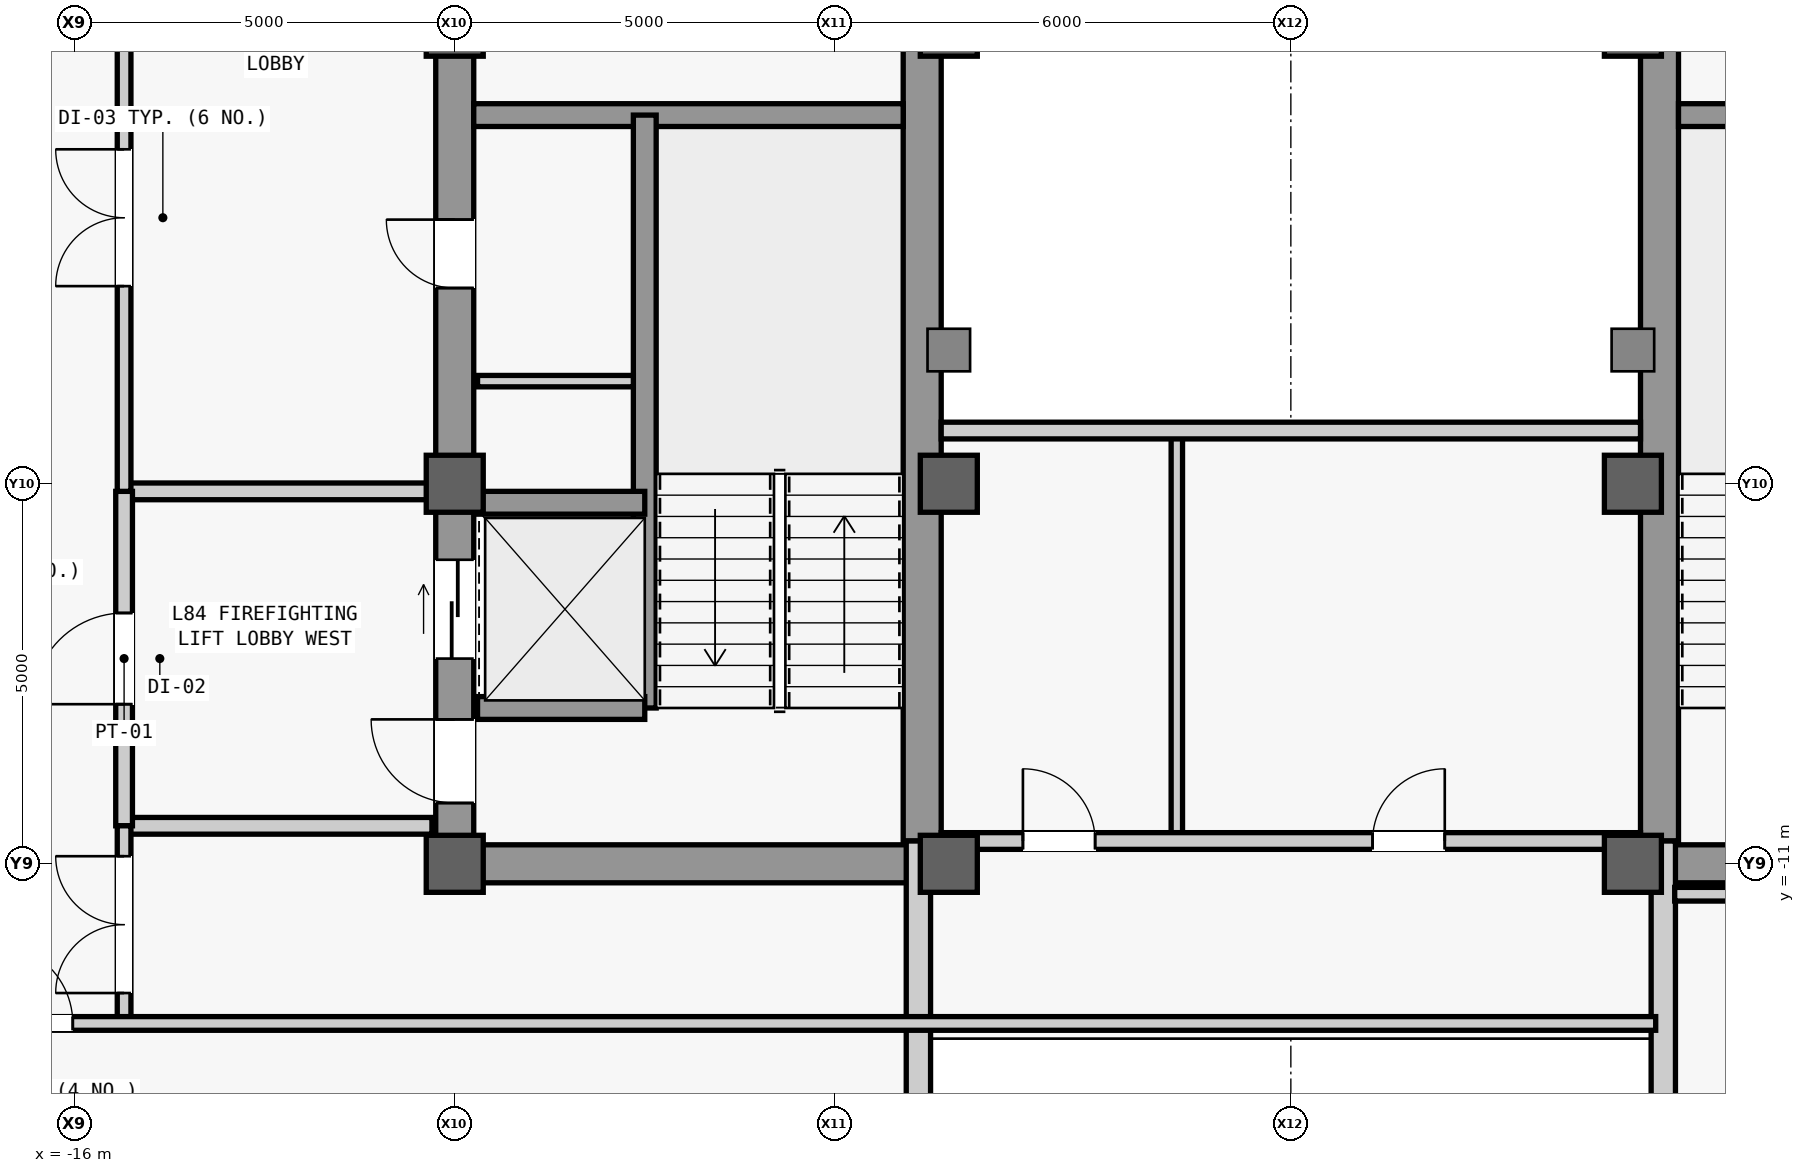
"""IFC4 building model, lengths in metres.
Left out: names, types, materials, properties, quantities, classifications, styles, units other than length and angle.
Written with IfcOpenShell. Run it as: python <this file> out.ifc"""

import sys

from ifc_helpers import new_model, si_unit, direction, frame, frame_2d, origin, origin_2d, place, context, subcontext, project, spatial, rectangle, extrude, source, transform, mapped, element, fill, save


model = new_model("IFC4")
c1 = context("Model", 3, precision=1e-05, world=origin(), true_north=direction((0.0, 1.0)))
c2 = subcontext(c1, "Body", "Model", "MODEL_VIEW")
j1 = project(units=[si_unit("LENGTHUNIT", "METRE"), si_unit("PLANEANGLEUNIT", "RADIAN")], contexts=[c1])
p1 = place(None, origin())
s1 = spatial("IfcSite", under=j1, at=p1, CompositionType="ELEMENT")
p2 = place(p1, origin())
s2 = spatial("IfcBuilding", under=s1, at=p2, CompositionType="ELEMENT")
p3 = place(p2, frame((0.0, 0.0, 354.3)))
s3 = spatial("IfcBuildingStorey", under=s2, at=p3, CompositionType="ELEMENT", Elevation=354.3)
m1 = source(origin(), c2, "Body", "SweptSolid", [
    extrude(rectangle(XDim=22.0, YDim=0.5, at=frame_2d((11.0, 0.0))), origin(), (0.0, 0.0, 1.0), 3.74),
])
p4 = place(p3, frame((-11.0, -11.0, 0.0), z_axis=(0.0, 0.0, 1.0), x_axis=(0.0, 1.0, 0.0)))
e1 = element("IfcWall", 1, at=p4, inside=s3, PredefinedType="SHEAR", context=c2, shape_type="MappedRepresentation", body=[
    mapped(m1, transform((0.0, 0.0, 0.0), scale=1.0)),
])
m2 = source(origin(), c2, "Body", "SweptSolid", [
    extrude(rectangle(XDim=1.1, YDim=2.2, at=frame_2d((0.55, 1.1))), frame((0.0, 0.26, 0.0), z_axis=(0.0, -1.0, 0.0), x_axis=(1.0, 0.0, 0.0)), (0.0, 0.0, 1.0), 0.52),
])
p5 = place(p4, frame((0.8, 0.0, 0.0)))
e2 = element("IfcOpeningElement", 2, at=p5, cuts=e1, PredefinedType="OPENING", context=c2, shape_type="MappedRepresentation", body=[
    mapped(m2, transform((0.0, 0.0, 0.0), scale=1.0)),
])
p6 = place(p4, frame((12.5, 0.0, 0.0)))
e3 = element("IfcOpeningElement", 3, at=p6, cuts=e1, PredefinedType="OPENING", context=c2, shape_type="MappedRepresentation", body=[
    mapped(m2, transform((0.0, 0.0, 0.0), scale=1.0)),
])
m3 = source(origin(), c2, "Body", "SweptSolid", [
    extrude(rectangle(XDim=0.9, YDim=2.15, at=frame_2d((0.45, 1.075))), frame((0.0, 0.26, 0.0), z_axis=(0.0, -1.0, 0.0), x_axis=(1.0, 0.0, 0.0)), (0.0, 0.0, 1.0), 0.52),
])
p7 = place(p4, frame((7.575, 0.0, 0.0)))
e4 = element("IfcOpeningElement", 4, at=p7, cuts=e1, PredefinedType="OPENING", context=c2, shape_type="MappedRepresentation", body=[
    mapped(m3, transform((0.0, 0.0, 0.0), scale=1.0)),
])
m4 = source(origin(), c2, "Body", "SweptSolid", [
    extrude(rectangle(XDim=1.2, YDim=2.3, at=frame_2d((0.6, 1.15))), frame((0.0, 0.26, 0.0), z_axis=(0.0, -1.0, 0.0), x_axis=(1.0, 0.0, 0.0)), (0.0, 0.0, 1.0), 0.52),
])
p8 = place(p4, frame((14.6, 0.0, 0.0)))
e5 = element("IfcOpeningElement", 5, at=p8, cuts=e1, PredefinedType="OPENING", context=c2, shape_type="MappedRepresentation", body=[
    mapped(m4, transform((0.0, 0.0, 0.0), scale=1.0)),
])
p9 = place(p4, frame((18.2, 0.0, 0.0)))
e6 = element("IfcOpeningElement", 6, at=p9, cuts=e1, PredefinedType="OPENING", context=c2, shape_type="MappedRepresentation", body=[
    mapped(m4, transform((0.0, 0.0, 0.0), scale=1.0)),
])
m5 = source(origin(), c2, "Body", "SweptSolid", [
    extrude(rectangle(XDim=1.3, YDim=2.3, at=frame_2d((0.65, 1.15))), frame((0.0, 0.26, 0.0), z_axis=(0.0, -1.0, 0.0), x_axis=(1.0, 0.0, 0.0)), (0.0, 0.0, 1.0), 0.52),
])
p10 = place(p4, frame((2.7, 0.0, 0.0)))
e7 = element("IfcOpeningElement", 7, at=p10, cuts=e1, PredefinedType="OPENING", context=c2, shape_type="MappedRepresentation", body=[
    mapped(m5, transform((0.0, 0.0, 0.0), scale=1.0)),
])
m6 = source(origin(), c2, "Body", "SweptSolid", [
    extrude(rectangle(XDim=21.4, YDim=0.5, at=frame_2d((10.7, 0.0))), origin(), (0.0, 0.0, 1.0), 3.74),
])
for number, where, z_axis, x_axis in (
    (8, (-4.85, -10.7, 0.0), (0.0, 0.0, 1.0), (0.0, 1.0, 0.0)),
    (9, (4.85, -10.7, 0.0), (0.0, 0.0, 1.0), (0.0, 1.0, 0.0)),
):
    element("IfcWall", number, at=place(p3, frame(where, z_axis=z_axis, x_axis=x_axis)), inside=s3, PredefinedType="SHEAR", context=c2, shape_type="MappedRepresentation", body=[
        mapped(m6, transform((0.0, 0.0, 0.0), scale=1.0)),
    ])
m7 = source(origin(), c2, "Body", "SweptSolid", [
    extrude(rectangle(XDim=5.9, YDim=0.5, at=frame_2d((2.95, 0.0))), origin(), (0.0, 0.0, 1.0), 3.74),
])
for number, where, z_axis, x_axis in (
    (10, (-10.75, -11.0, 0.0), (0.0, 0.0, 1.0), (1.0, 0.0, 0.0)),
    (11, (4.85, -11.0, 0.0), (0.0, 0.0, 1.0), (1.0, 0.0, 0.0)),
):
    element("IfcWall", number, at=place(p3, frame(where, z_axis=z_axis, x_axis=x_axis)), inside=s3, PredefinedType="SHEAR", context=c2, shape_type="MappedRepresentation", body=[
        mapped(m7, transform((0.0, 0.0, 0.0), scale=1.0)),
    ])
m8 = source(origin(), c2, "Body", "SweptSolid", [
    extrude(rectangle(XDim=5.65, YDim=0.3, at=frame_2d((2.825, 0.0))), origin(), (0.0, 0.0, 1.0), 3.74),
])
for number, where, z_axis, x_axis in (
    (12, (-10.75, -1.15, 0.0), (0.0, 0.0, 1.0), (1.0, 0.0, 0.0)),
    (13, (5.1, -1.15, 0.0), (0.0, 0.0, 1.0), (1.0, 0.0, 0.0)),
):
    element("IfcWall", number, at=place(p3, frame(where, z_axis=z_axis, x_axis=x_axis)), inside=s3, PredefinedType="SHEAR", context=c2, shape_type="MappedRepresentation", body=[
        mapped(m8, transform((0.0, 0.0, 0.0), scale=1.0)),
    ])
m9 = source(origin(), c2, "Body", "SweptSolid", [
    extrude(rectangle(XDim=0.75, YDim=0.75, at=origin_2d()), origin(), (0.0, 0.0, 1.0), 4.0),
])
for number, where, z_axis, x_axis in (
    (14, (-11.0, -11.0, 0.0), (0.0, 0.0, 1.0), (1.0, 0.0, 0.0)),
    (15, (-11.0, -6.0, 0.0), (0.0, 0.0, 1.0), (1.0, 0.0, 0.0)),
    (16, (-11.0, 0.0, 0.0), (0.0, 0.0, 1.0), (1.0, 0.0, 0.0)),
    (17, (-4.5, -11.0, 0.0), (0.0, 0.0, 1.0), (1.0, 0.0, 0.0)),
    (18, (-4.5, -6.0, 0.0), (0.0, 0.0, 1.0), (1.0, 0.0, 0.0)),
    (19, (-4.5, 0.0, 0.0), (0.0, 0.0, 1.0), (1.0, 0.0, 0.0)),
    (20, (4.5, -11.0, 0.0), (0.0, 0.0, 1.0), (1.0, 0.0, 0.0)),
    (21, (4.5, -6.0, 0.0), (0.0, 0.0, 1.0), (1.0, 0.0, 0.0)),
    (22, (4.5, 0.0, 0.0), (0.0, 0.0, 1.0), (1.0, 0.0, 0.0)),
):
    element("IfcColumn", number, at=place(p3, frame(where, z_axis=z_axis, x_axis=x_axis)), inside=s3, PredefinedType="COLUMN", context=c2, shape_type="MappedRepresentation", body=[
        mapped(m9, transform((0.0, 0.0, 0.0), scale=1.0)),
    ])
m10 = source(origin(), c2, "Body", "SweptSolid", [
    extrude(rectangle(XDim=14.98, YDim=0.32, at=frame_2d((7.49, 0.0))), origin(), (0.0, 0.0, 1.0), 3.045),
])
for number, where, z_axis, x_axis in (
    (23, (-4.9, -25.68, 0.0), (0.0, 0.0, 1.0), (0.0, 1.0, 0.0)),
    (24, (4.9, -25.68, 0.0), (0.0, 0.0, 1.0), (0.0, 1.0, 0.0)),
):
    element("IfcWall", number, at=place(p3, frame(where, z_axis=z_axis, x_axis=x_axis)), inside=s3, PredefinedType="STANDARD", context=c2, shape_type="MappedRepresentation", body=[
        mapped(m10, transform((0.0, 0.0, 0.0), scale=1.0)),
    ])
m11 = source(origin(), c2, "Body", "SweptSolid", [
    extrude(rectangle(XDim=7.8, YDim=0.3, at=frame_2d((3.9, 0.0))), origin(), (0.0, 0.0, 1.0), 3.74),
])
p11 = place(p3, frame((-8.5, -8.95, 0.0), z_axis=(0.0, 0.0, 1.0), x_axis=(0.0, 1.0, 0.0)))
e25 = element("IfcWall", 25, at=p11, inside=s3, PredefinedType="SHEAR", context=c2, shape_type="MappedRepresentation", body=[
    mapped(m11, transform((0.0, 0.0, 0.0), scale=1.0)),
])
m12 = source(origin(), c2, "Body", "SweptSolid", [
    extrude(rectangle(XDim=2.2, YDim=0.3, at=frame_2d((1.1, 0.0))), origin(), (0.0, 0.0, 1.0), 3.74),
])
for number, where, z_axis, x_axis in (
    (26, (-10.7, -8.95, 0.0), (0.0, 0.0, 1.0), (1.0, 0.0, 0.0)),
    (27, (-10.7, -6.25, 0.0), (0.0, 0.0, 1.0), (1.0, 0.0, 0.0)),
):
    element("IfcWall", number, at=place(p3, frame(where, z_axis=z_axis, x_axis=x_axis)), inside=s3, PredefinedType="SHEAR", context=c2, shape_type="MappedRepresentation", body=[
        mapped(m12, transform((0.0, 0.0, 0.0), scale=1.0)),
    ])
m13 = source(origin(), c2, "Body", "SweptSolid", [
    extrude(rectangle(XDim=2.05, YDim=0.15, at=frame_2d((1.025, 0.0))), origin(), (0.0, 0.0, 1.0), 3.74),
])
p12 = place(p3, frame((-10.7, -4.65, 0.0), z_axis=(0.0, 0.0, 1.0), x_axis=(1.0, 0.0, 0.0)))
e28 = element("IfcWall", 28, at=p12, inside=s3, PredefinedType="PARTITIONING", context=c2, shape_type="MappedRepresentation", body=[
    mapped(m13, transform((0.0, 0.0, 0.0), scale=1.0)),
])
m14 = source(origin(), c2, "Body", "SweptSolid", [
    extrude(rectangle(XDim=4.05, YDim=0.22, at=frame_2d((2.025, 0.0))), origin(), (0.0, 0.0, 1.0), 3.74),
])
p13 = place(p3, frame((-15.35, -10.5, 0.0), z_axis=(0.0, 0.0, 1.0), x_axis=(1.0, 0.0, 0.0)))
e29 = element("IfcWall", 29, at=p13, inside=s3, PredefinedType="PARTITIONING", context=c2, shape_type="MappedRepresentation", body=[
    mapped(m14, transform((0.0, 0.0, 0.0), scale=1.0)),
])
m15 = source(origin(), c2, "Body", "SweptSolid", [
    extrude(rectangle(XDim=4.05, YDim=0.22, at=frame_2d((2.025, 0.0))), origin(), (0.0, 0.0, 1.0), 3.124),
])
p14 = place(p3, frame((-15.35, -6.1, 0.0), z_axis=(0.0, 0.0, 1.0), x_axis=(1.0, 0.0, 0.0)))
e30 = element("IfcWall", 30, at=p14, inside=s3, PredefinedType="PARTITIONING", context=c2, shape_type="MappedRepresentation", body=[
    mapped(m15, transform((0.0, 0.0, 0.0), scale=1.0)),
])
m16 = source(origin(), c2, "Body", "SweptSolid", [
    extrude(rectangle(XDim=4.4, YDim=0.22, at=frame_2d((2.2, 0.0))), origin(), (0.0, 0.0, 1.0), 3.74),
])
p15 = place(p3, frame((-15.35, -10.5, 0.0), z_axis=(0.0, 0.0, 1.0), x_axis=(0.0, 1.0, 0.0)))
e31 = element("IfcWall", 31, at=p15, inside=s3, PredefinedType="PARTITIONING", context=c2, shape_type="MappedRepresentation", body=[
    mapped(m16, transform((0.0, 0.0, 0.0), scale=1.0)),
])
m17 = source(origin(), c2, "Body", "SweptSolid", [
    extrude(rectangle(XDim=1.2, YDim=2.2, at=frame_2d((0.6, 1.1))), frame((0.0, 0.12, 0.0), z_axis=(0.0, -1.0, 0.0), x_axis=(1.0, 0.0, 0.0)), (0.0, 0.0, 1.0), 0.24),
])
p16 = place(p15, frame((1.6, 0.0, 0.0)))
e32 = element("IfcOpeningElement", 32, at=p16, cuts=e31, PredefinedType="OPENING", context=c2, shape_type="MappedRepresentation", body=[
    mapped(m17, transform((0.0, 0.0, 0.0), scale=1.0)),
])
m18 = source(origin(), c2, "Body", "SweptSolid", [
    extrude(rectangle(XDim=16.6, YDim=0.18, at=frame_2d((8.3, 0.0))), origin(), (0.0, 0.0, 1.0), 3.74),
])
p17 = place(p3, frame((-15.35, -6.1, 0.0), z_axis=(0.0, 0.0, 1.0), x_axis=(0.0, 1.0, 0.0)))
e33 = element("IfcWall", 33, at=p17, inside=s3, PredefinedType="PARTITIONING", context=c2, shape_type="MappedRepresentation", body=[
    mapped(m18, transform((0.0, 0.0, 0.0), scale=1.0)),
])
m19 = source(origin(), c2, "Body", "SweptSolid", [
    extrude(rectangle(XDim=1.8, YDim=2.25, at=frame_2d((0.9, 1.125))), frame((0.0, 0.1, 0.0), z_axis=(0.0, -1.0, 0.0), x_axis=(1.0, 0.0, 0.0)), (0.0, 0.0, 1.0), 0.2),
])
p18 = place(p17, frame((2.7, 0.0, 0.0)))
e34 = element("IfcOpeningElement", 34, at=p18, cuts=e33, PredefinedType="OPENING", context=c2, shape_type="MappedRepresentation", body=[
    mapped(m19, transform((0.0, 0.0, 0.0), scale=1.0)),
])
p19 = place(p17, frame((11.0, 0.0, 0.0)))
e35 = element("IfcOpeningElement", 35, at=p19, cuts=e33, PredefinedType="OPENING", context=c2, shape_type="MappedRepresentation", body=[
    mapped(m19, transform((0.0, 0.0, 0.0), scale=1.0)),
])
m20 = source(origin(), c2, "Body", "SweptSolid", [
    extrude(rectangle(XDim=5.4, YDim=0.15, at=frame_2d((2.7, 0.0))), origin(), (0.0, 0.0, 1.0), 3.74),
])
p20 = place(p3, frame((-1.5, -10.7, 0.0), z_axis=(0.0, 0.0, 1.0), x_axis=(0.0, 1.0, 0.0)))
e36 = element("IfcWall", 36, at=p20, inside=s3, PredefinedType="PARTITIONING", context=c2, shape_type="MappedRepresentation", body=[
    mapped(m20, transform((0.0, 0.0, 0.0), scale=1.0)),
])
m21 = source(origin(), c2, "Body", "SweptSolid", [
    extrude(rectangle(XDim=9.2, YDim=0.22, at=frame_2d((4.6, 0.0))), origin(), (0.0, 0.0, 1.0), 2.79),
])
p21 = place(p3, frame((-4.6, -10.7, 0.0), z_axis=(0.0, 0.0, 1.0), x_axis=(1.0, 0.0, 0.0)))
e37 = element("IfcWall", 37, at=p21, inside=s3, PredefinedType="PARTITIONING", context=c2, shape_type="MappedRepresentation", body=[
    mapped(m21, transform((0.0, 0.0, 0.0), scale=1.0)),
])
m22 = source(origin(), c2, "Body", "SweptSolid", [
    extrude(rectangle(XDim=0.95, YDim=2.15, at=frame_2d((0.475, 1.075))), frame((0.0, 0.12, 0.0), z_axis=(0.0, -1.0, 0.0), x_axis=(1.0, 0.0, 0.0)), (0.0, 0.0, 1.0), 0.24),
])
p22 = place(p21, frame((1.075, 0.0, 0.0)))
e38 = element("IfcOpeningElement", 38, at=p22, cuts=e37, PredefinedType="OPENING", context=c2, shape_type="MappedRepresentation", body=[
    mapped(m22, transform((0.0, 0.0, 0.0), scale=1.0)),
])
p23 = place(p21, frame((5.675, 0.0, 0.0)))
e39 = element("IfcOpeningElement", 39, at=p23, cuts=e37, PredefinedType="OPENING", context=c2, shape_type="MappedRepresentation", body=[
    mapped(m22, transform((0.0, 0.0, 0.0), scale=1.0)),
])
m23 = source(origin(), c2, "Body", "SweptSolid", [
    extrude(rectangle(XDim=9.2, YDim=0.22, at=frame_2d((4.6, 0.0))), origin(), (0.0, 0.0, 1.0), 3.74),
])
p24 = place(p3, frame((-4.6, -5.3, 0.0), z_axis=(0.0, 0.0, 1.0), x_axis=(1.0, 0.0, 0.0)))
e40 = element("IfcWall", 40, at=p24, inside=s3, PredefinedType="PARTITIONING", context=c2, shape_type="MappedRepresentation", body=[
    mapped(m23, transform((0.0, 0.0, 0.0), scale=1.0)),
])
m24 = source(origin(), c2, "Body", "SweptSolid", [
    extrude(rectangle(XDim=2.6, YDim=0.18, at=frame_2d((1.3, 0.0))), origin(), (0.0, 0.0, 1.0), 3.74),
])
p25 = place(p3, frame((-15.35, -13.1, 0.0), z_axis=(0.0, 0.0, 1.0), x_axis=(0.0, 1.0, 0.0)))
e41 = element("IfcWall", 41, at=p25, inside=s3, PredefinedType="PARTITIONING", context=c2, shape_type="MappedRepresentation", body=[
    mapped(m24, transform((0.0, 0.0, 0.0), scale=1.0)),
])
p26 = place(p25, frame((0.4, 0.0, 0.0)))
e42 = element("IfcOpeningElement", 42, at=p26, cuts=e41, PredefinedType="OPENING", context=c2, shape_type="MappedRepresentation", body=[
    mapped(m19, transform((0.0, 0.0, 0.0), scale=1.0)),
])
m25 = source(origin(), c2, "Body", "SweptSolid", [
    extrude(rectangle(XDim=22.55, YDim=0.18, at=frame_2d((11.275, 0.0))), origin(), (0.0, 0.0, 1.0), 3.74),
])
p27 = place(p3, frame((-17.75, -13.1, 0.0), z_axis=(0.0, 0.0, 1.0), x_axis=(1.0, 0.0, 0.0)))
e43 = element("IfcWall", 43, at=p27, inside=s3, PredefinedType="PARTITIONING", context=c2, shape_type="MappedRepresentation", body=[
    mapped(m25, transform((0.0, 0.0, 0.0), scale=1.0)),
])
m26 = source(origin(), c2, "Body", "SweptSolid", [
    extrude(rectangle(XDim=1.05, YDim=2.2, at=frame_2d((0.525, 1.1))), frame((0.0, 0.1, 0.0), z_axis=(0.0, -1.0, 0.0), x_axis=(1.0, 0.0, 0.0)), (0.0, 0.0, 1.0), 0.2),
])
p28 = place(p27, frame((0.675, 0.0, 0.0)))
e44 = element("IfcOpeningElement", 44, at=p28, cuts=e43, PredefinedType="OPENING", context=c2, shape_type="MappedRepresentation", body=[
    mapped(m26, transform((0.0, 0.0, 0.0), scale=1.0)),
])
m27 = source(origin(), c2, "Body", "SweptSolid", [
    extrude(rectangle(XDim=12.7, YDim=0.18, at=frame_2d((6.35, 0.0))), origin(), (0.0, 0.0, 1.0), 2.79),
])
p29 = place(p3, frame((5.05, -11.4, 0.0), z_axis=(0.0, 0.0, 1.0), x_axis=(1.0, 0.0, 0.0)))
e45 = element("IfcWall", 45, at=p29, inside=s3, PredefinedType="PARTITIONING", context=c2, shape_type="MappedRepresentation", body=[
    mapped(m27, transform((0.0, 0.0, 0.0), scale=1.0)),
])
p30 = place(p29, frame((10.975, 0.0, 0.0)))
e46 = element("IfcOpeningElement", 46, at=p30, cuts=e45, PredefinedType="OPENING", context=c2, shape_type="MappedRepresentation", body=[
    mapped(m26, transform((0.0, 0.0, 0.0), scale=1.0)),
])
m28 = source(origin(), c2, "Body", "SweptSolid", [
    extrude(rectangle(XDim=1.1, YDim=2.2, at=frame_2d((0.55, 1.1))), frame((0.0, 0.025, 0.0), z_axis=(0.0, -1.0, 0.0), x_axis=(1.0, 0.0, 0.0)), (0.0, 0.0, 1.0), 0.05),
])
p31 = place(p5, origin())
e47 = element("IfcDoor", 47, at=p31, inside=s3, OperationType="SINGLE_SWING_RIGHT", PredefinedType="DOOR", context=c2, shape_type="MappedRepresentation", body=[
    mapped(m28, transform((0.0, 0.0, 0.0), scale=1.0)),
])
fill(e2, e47)
m29 = source(origin(), c2, "Body", "SweptSolid", [
    extrude(rectangle(XDim=0.9, YDim=2.15, at=frame_2d((0.45, 1.075))), frame((0.0, 0.025, 0.0), z_axis=(0.0, -1.0, 0.0), x_axis=(1.0, 0.0, 0.0)), (0.0, 0.0, 1.0), 0.05),
])
p32 = place(p7, origin())
e48 = element("IfcDoor", 48, at=p32, inside=s3, OperationType="SINGLE_SWING_RIGHT", PredefinedType="DOOR", context=c2, shape_type="MappedRepresentation", body=[
    mapped(m29, transform((0.0, 0.0, 0.0), scale=1.0)),
])
fill(e4, e48)
m30 = source(origin(), c2, "Body", "SweptSolid", [
    extrude(rectangle(XDim=1.2, YDim=2.2, at=frame_2d((0.6, 1.1))), frame((0.0, 0.025, 0.0), z_axis=(0.0, -1.0, 0.0), x_axis=(1.0, 0.0, 0.0)), (0.0, 0.0, 1.0), 0.05),
])
p33 = place(p16, origin())
e49 = element("IfcDoor", 49, at=p33, inside=s3, OperationType="SINGLE_SWING_LEFT", PredefinedType="DOOR", context=c2, shape_type="MappedRepresentation", body=[
    mapped(m30, transform((0.0, 0.0, 0.0), scale=1.0)),
])
fill(e32, e49)
m31 = source(origin(), c2, "Body", "SweptSolid", [
    extrude(rectangle(XDim=1.8, YDim=2.25, at=frame_2d((0.9, 1.125))), frame((0.0, 0.025, 0.0), z_axis=(0.0, -1.0, 0.0), x_axis=(1.0, 0.0, 0.0)), (0.0, 0.0, 1.0), 0.05),
])
p34 = place(p18, origin())
e50 = element("IfcDoor", 50, at=p34, inside=s3, OperationType="SINGLE_SWING_LEFT", PredefinedType="DOOR", context=c2, shape_type="MappedRepresentation", body=[
    mapped(m31, transform((0.0, 0.0, 0.0), scale=1.0)),
])
fill(e34, e50)
m32 = source(origin(), c2, "Body", "SweptSolid", [
    extrude(rectangle(XDim=0.95, YDim=2.15, at=frame_2d((0.475, 1.075))), frame((0.0, 0.025, 0.0), z_axis=(0.0, -1.0, 0.0), x_axis=(1.0, 0.0, 0.0)), (0.0, 0.0, 1.0), 0.05),
])
p35 = place(p22, origin())
e51 = element("IfcDoor", 51, at=p35, inside=s3, OperationType="SINGLE_SWING_LEFT", PredefinedType="DOOR", context=c2, shape_type="MappedRepresentation", body=[
    mapped(m32, transform((0.0, 0.0, 0.0), scale=1.0)),
])
fill(e38, e51)
p36 = place(p23, origin())
e52 = element("IfcDoor", 52, at=p36, inside=s3, OperationType="SINGLE_SWING_RIGHT", PredefinedType="DOOR", context=c2, shape_type="MappedRepresentation", body=[
    mapped(m32, transform((0.0, 0.0, 0.0), scale=1.0)),
])
fill(e39, e52)
p37 = place(p26, origin())
e53 = element("IfcDoor", 53, at=p37, inside=s3, OperationType="DOUBLE_DOOR_SINGLE_SWING", PredefinedType="DOOR", context=c2, shape_type="MappedRepresentation", body=[
    mapped(m31, transform((0.0, 0.0, 0.0), scale=1.0)),
])
fill(e42, e53)
m33 = source(origin(), c2, "Body", "SweptSolid", [
    extrude(rectangle(XDim=1.05, YDim=2.2, at=frame_2d((0.525, 1.1))), frame((0.0, 0.025, 0.0), z_axis=(0.0, -1.0, 0.0), x_axis=(1.0, 0.0, 0.0)), (0.0, 0.0, 1.0), 0.05),
])
p38 = place(p28, origin())
e54 = element("IfcDoor", 54, at=p38, inside=s3, OperationType="SINGLE_SWING_LEFT", PredefinedType="DOOR", context=c2, shape_type="MappedRepresentation", body=[
    mapped(m33, transform((0.0, 0.0, 0.0), scale=1.0)),
])
fill(e44, e54)
m34 = source(origin(), c2, "Body", "SweptSolid", [
    extrude(rectangle(XDim=1.3, YDim=2.3, at=frame_2d((0.65, 1.15))), frame((0.0, 0.025, 0.0), z_axis=(0.0, -1.0, 0.0), x_axis=(1.0, 0.0, 0.0)), (0.0, 0.0, 1.0), 0.05),
])
p39 = place(p10, origin())
e55 = element("IfcDoor", 55, at=p39, inside=s3, OperationType="SLIDING_TO_LEFT", PredefinedType="DOOR", context=c2, shape_type="MappedRepresentation", body=[
    mapped(m34, transform((0.0, 0.0, 0.0), scale=1.0)),
])
fill(e7, e55)
save(model, sys.argv[1])
